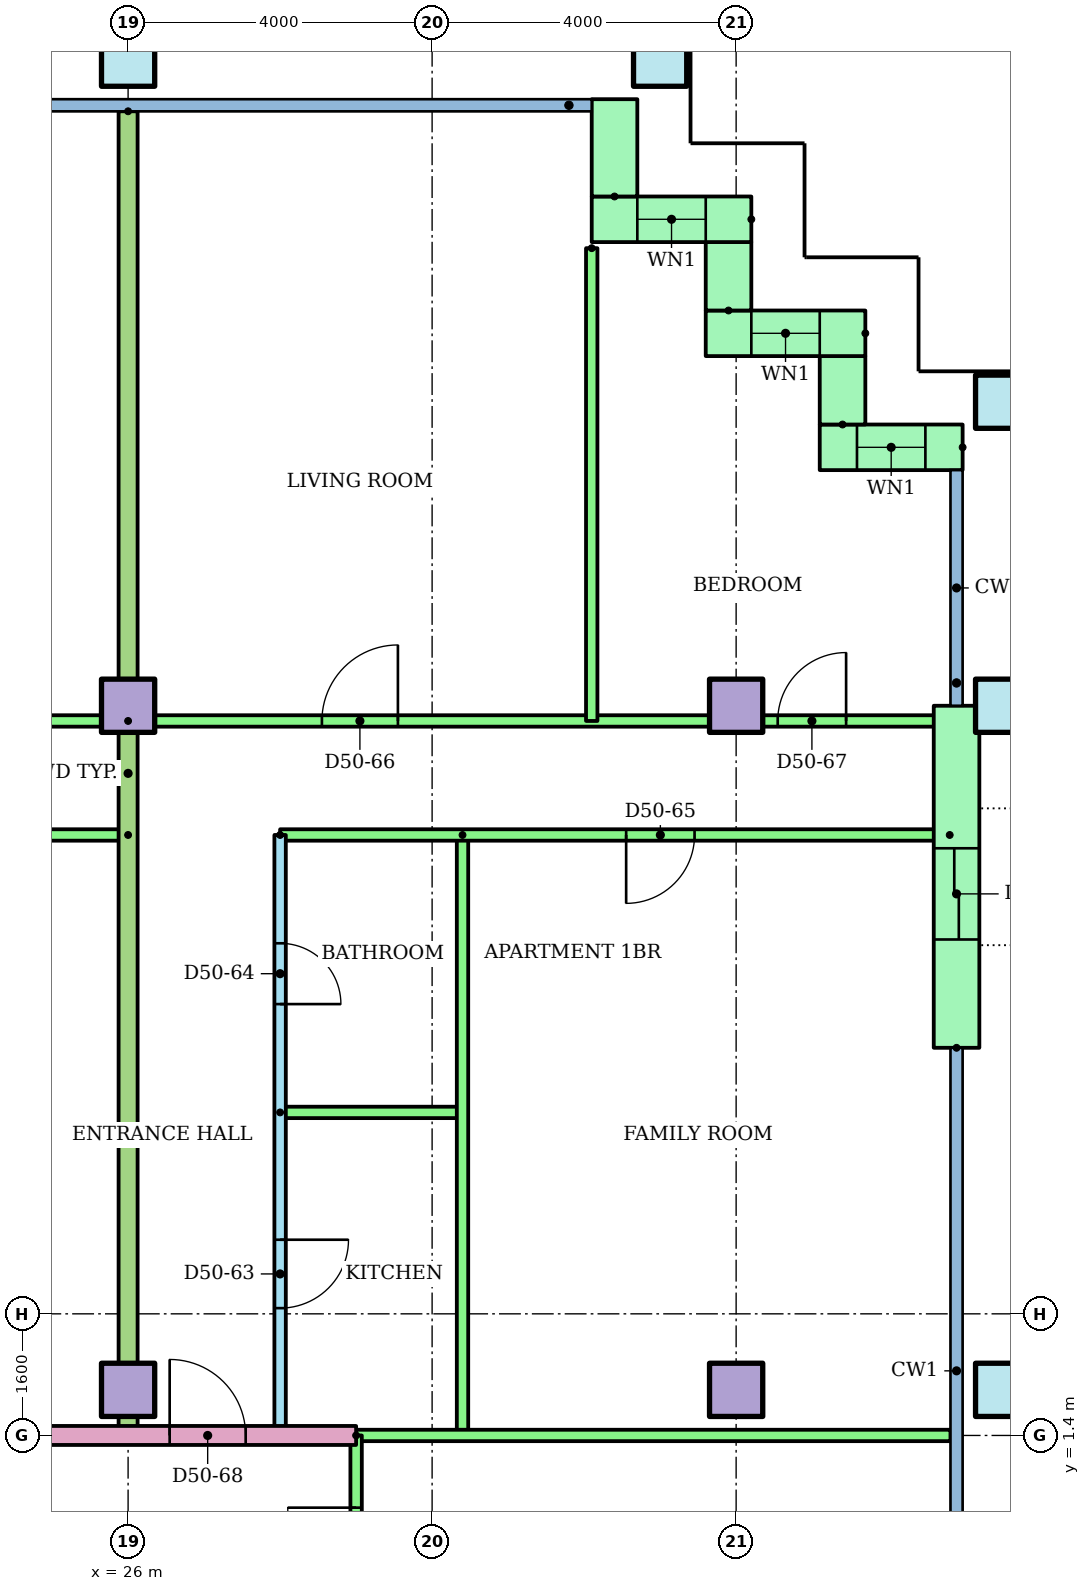
"""IFC4 building model, lengths in metres.
Left out: names, types, materials, properties, quantities, classifications, styles, units other than length and angle.
Written with IfcOpenShell. Run it as: python <this file> out.ifc"""

import sys

from ifc_helpers import new_model, si_unit, direction, frame, frame_2d, origin, origin_2d, place, context, subcontext, project, spatial, rectangle, hollow_rectangle, extrude, element, fill, save


model = new_model("IFC4")
c1 = context("Model", 3, precision=1e-05, world=origin(), true_north=direction((0.0, 1.0)))
c2 = subcontext(c1, "Body", "Model", "MODEL_VIEW")
j1 = project(units=[si_unit("LENGTHUNIT", "METRE"), si_unit("PLANEANGLEUNIT", "RADIAN")], contexts=[c1])
p1 = place(None, origin())
s1 = spatial("IfcSite", under=j1, at=p1, CompositionType="ELEMENT")
p2 = place(p1, origin())
s2 = spatial("IfcBuilding", under=s1, at=p2, CompositionType="ELEMENT")
p3 = place(p2, frame((0.0, 0.0, 190.9)))
s3 = spatial("IfcBuildingStorey", under=s2, at=p3, CompositionType="ELEMENT", Elevation=190.9)
for number, where in (
    (1, (26.0, 2.0, 0.0)),
    (2, (34.0, 2.0, 0.0)),
):
    element("IfcColumn", number, at=place(p3, frame(where)), inside=s3, PredefinedType="COLUMN", context=c2, shape_type="SweptSolid", body=[
        extrude(rectangle(XDim=0.7, YDim=0.7, at=origin_2d()), origin(), (0.0, 0.0, 1.0), 3.2),
    ])
p4 = place(p3, frame((37.5, 2.0, 0.0)))
e3 = element("IfcColumn", 3, at=p4, inside=s3, PredefinedType="COLUMN", context=c2, shape_type="SweptSolid", body=[
    extrude(hollow_rectangle(XDim=0.7, YDim=0.7, WallThickness=0.036, at=origin_2d()), origin(), (0.0, 0.0, 1.0), 3.2),
])
for number, where in (
    (4, (26.0, 11.0, 0.0)),
    (5, (34.0, 11.0, 0.0)),
):
    element("IfcColumn", number, at=place(p3, frame(where)), inside=s3, PredefinedType="COLUMN", context=c2, shape_type="SweptSolid", body=[
        extrude(rectangle(XDim=0.7, YDim=0.7, at=origin_2d()), origin(), (0.0, 0.0, 1.0), 3.2),
    ])
for number, where in (
    (6, (37.5, 11.0, 0.0)),
    (7, (37.5, 15.0, 0.0)),
    (8, (26.0, 19.5, 0.0)),
    (9, (33.0, 19.5, 0.0)),
):
    element("IfcColumn", number, at=place(p3, frame(where)), inside=s3, PredefinedType="COLUMN", context=c2, shape_type="SweptSolid", body=[
        extrude(hollow_rectangle(XDim=0.7, YDim=0.7, WallThickness=0.036, at=origin_2d()), origin(), (0.0, 0.0, 1.0), 3.2),
    ])
p5 = place(p3, frame((36.98, 14.4, 0.0), z_axis=(0.0, 0.0, 1.0), x_axis=(-1.0, 0.0, 0.0)))
e10 = element("IfcWall", 10, at=p5, inside=s3, PredefinedType="STANDARD", context=c2, shape_type="SweptSolid", body=[
    extrude(rectangle(XDim=1.88, YDim=0.6, at=frame_2d((0.94, 0.0))), origin(), (0.0, 0.0, 1.0), 2.8),
])
p6 = place(p5, frame((0.49, 0.0, 0.9)))
e11 = element("IfcOpeningElement", 11, at=p6, cuts=e10, PredefinedType="OPENING", context=c2, shape_type="SweptSolid", body=[
    extrude(rectangle(XDim=0.9, YDim=1.5, at=frame_2d((0.45, 0.75))), frame((0.0, 0.31, 0.0), z_axis=(0.0, -1.0, 0.0), x_axis=(1.0, 0.0, 0.0)), (0.0, 0.0, 1.0), 0.62),
])
p7 = place(p3, frame((35.4, 14.7, 0.0), z_axis=(0.0, 0.0, 1.0), x_axis=(0.0, 1.0, 0.0)))
e12 = element("IfcWall", 12, at=p7, inside=s3, PredefinedType="STANDARD", context=c2, shape_type="SweptSolid", body=[
    extrude(rectangle(XDim=0.9, YDim=0.6, at=frame_2d((0.45, 0.0))), origin(), (0.0, 0.0, 1.0), 2.8),
])
p8 = place(p3, frame((35.7, 15.9, 0.0), z_axis=(0.0, 0.0, 1.0), x_axis=(-1.0, 0.0, 0.0)))
e13 = element("IfcWall", 13, at=p8, inside=s3, PredefinedType="STANDARD", context=c2, shape_type="SweptSolid", body=[
    extrude(rectangle(XDim=2.1, YDim=0.6, at=frame_2d((1.05, 0.0))), origin(), (0.0, 0.0, 1.0), 2.8),
])
p9 = place(p8, frame((0.6, 0.0, 0.9)))
e14 = element("IfcOpeningElement", 14, at=p9, cuts=e13, PredefinedType="OPENING", context=c2, shape_type="SweptSolid", body=[
    extrude(rectangle(XDim=0.9, YDim=1.5, at=frame_2d((0.45, 0.75))), frame((0.0, 0.31, 0.0), z_axis=(0.0, -1.0, 0.0), x_axis=(1.0, 0.0, 0.0)), (0.0, 0.0, 1.0), 0.62),
])
p10 = place(p3, frame((33.9, 16.2, 0.0), z_axis=(0.0, 0.0, 1.0), x_axis=(0.0, 1.0, 0.0)))
e15 = element("IfcWall", 15, at=p10, inside=s3, PredefinedType="STANDARD", context=c2, shape_type="SweptSolid", body=[
    extrude(rectangle(XDim=0.9, YDim=0.6, at=frame_2d((0.45, 0.0))), origin(), (0.0, 0.0, 1.0), 2.8),
])
p11 = place(p3, frame((34.2, 17.4, 0.0), z_axis=(0.0, 0.0, 1.0), x_axis=(-1.0, 0.0, 0.0)))
e16 = element("IfcWall", 16, at=p11, inside=s3, PredefinedType="STANDARD", context=c2, shape_type="SweptSolid", body=[
    extrude(rectangle(XDim=2.1, YDim=0.6, at=frame_2d((1.05, 0.0))), origin(), (0.0, 0.0, 1.0), 2.8),
])
p12 = place(p11, frame((0.6, 0.0, 0.9)))
e17 = element("IfcOpeningElement", 17, at=p12, cuts=e16, PredefinedType="OPENING", context=c2, shape_type="SweptSolid", body=[
    extrude(rectangle(XDim=0.9, YDim=1.5, at=frame_2d((0.45, 0.75))), frame((0.0, 0.31, 0.0), z_axis=(0.0, -1.0, 0.0), x_axis=(1.0, 0.0, 0.0)), (0.0, 0.0, 1.0), 0.62),
])
p13 = place(p3, frame((32.4, 17.7, 0.0), z_axis=(0.0, 0.0, 1.0), x_axis=(0.0, 1.0, 0.0)))
e18 = element("IfcWall", 18, at=p13, inside=s3, PredefinedType="STANDARD", context=c2, shape_type="SweptSolid", body=[
    extrude(rectangle(XDim=1.28, YDim=0.6, at=frame_2d((0.64, 0.0))), origin(), (0.0, 0.0, 1.0), 2.8),
])
p14 = place(p3, frame((36.9, 6.5, 0.0), z_axis=(0.0, 0.0, 1.0), x_axis=(0.0, 1.0, 0.0)))
e19 = element("IfcWall", 19, at=p14, inside=s3, PredefinedType="STANDARD", context=c2, shape_type="SweptSolid", body=[
    extrude(rectangle(XDim=4.5, YDim=0.6, at=frame_2d((2.25, 0.0))), origin(), (0.0, 0.0, 1.0), 2.8),
])
p15 = place(p14, frame((1.425, 0.0, 0.0)))
e20 = element("IfcOpeningElement", 20, at=p15, cuts=e19, PredefinedType="OPENING", context=c2, shape_type="SweptSolid", body=[
    extrude(rectangle(XDim=1.2, YDim=2.1, at=frame_2d((0.6, 1.05))), frame((0.0, 0.31, 0.0), z_axis=(0.0, -1.0, 0.0), x_axis=(1.0, 0.0, 0.0)), (0.0, 0.0, 1.0), 0.62),
])
p16 = place(p3, frame((26.0, 9.3, 0.0), z_axis=(0.0, 0.0, 1.0), x_axis=(-1.0, 0.0, 0.0)))
e21 = element("IfcWall", 21, at=p16, inside=s3, PredefinedType="PARTITIONING", context=c2, shape_type="SweptSolid", body=[
    extrude(rectangle(XDim=10.0, YDim=0.15, at=frame_2d((5.0, 0.0))), origin(), (0.0, 0.0, 1.0), 2.4),
])
p17 = place(p16, frame((5.525, 0.0, 0.0)))
e22 = element("IfcOpeningElement", 22, at=p17, cuts=e21, PredefinedType="OPENING", context=c2, shape_type="SweptSolid", body=[
    extrude(rectangle(XDim=0.9, YDim=2.1, at=frame_2d((0.45, 1.05))), frame((0.0, 0.085, 0.0), z_axis=(0.0, -1.0, 0.0), x_axis=(1.0, 0.0, 0.0)), (0.0, 0.0, 1.0), 0.17),
])
p18 = place(p16, frame((1.725, 0.0, 0.0)))
e23 = element("IfcOpeningElement", 23, at=p18, cuts=e21, PredefinedType="OPENING", context=c2, shape_type="SweptSolid", body=[
    extrude(rectangle(XDim=0.9, YDim=2.1, at=frame_2d((0.45, 1.05))), frame((0.0, 0.085, 0.0), z_axis=(0.0, -1.0, 0.0), x_axis=(1.0, 0.0, 0.0)), (0.0, 0.0, 1.0), 0.17),
])
p19 = place(p3, frame((14.0, 10.8, 0.0)))
e24 = element("IfcWall", 24, at=p19, inside=s3, PredefinedType="PARTITIONING", context=c2, shape_type="SweptSolid", body=[
    extrude(rectangle(XDim=12.0, YDim=0.15, at=frame_2d((6.0, 0.0))), origin(), (0.0, 0.0, 1.0), 2.4),
])
p20 = place(p19, frame((1.5, 0.0, 0.0)))
e25 = element("IfcOpeningElement", 25, at=p20, cuts=e24, PredefinedType="OPENING", context=c2, shape_type="SweptSolid", body=[
    extrude(rectangle(XDim=1.0, YDim=2.1, at=frame_2d((0.5, 1.05))), frame((0.0, 0.085, 0.0), z_axis=(0.0, -1.0, 0.0), x_axis=(1.0, 0.0, 0.0)), (0.0, 0.0, 1.0), 0.17),
])
p21 = place(p19, frame((7.5, 0.0, 0.0)))
e26 = element("IfcOpeningElement", 26, at=p21, cuts=e24, PredefinedType="OPENING", context=c2, shape_type="SweptSolid", body=[
    extrude(rectangle(XDim=1.0, YDim=2.1, at=frame_2d((0.5, 1.05))), frame((0.0, 0.085, 0.0), z_axis=(0.0, -1.0, 0.0), x_axis=(1.0, 0.0, 0.0)), (0.0, 0.0, 1.0), 0.17),
])
p22 = place(p3, frame((28.0, 9.3, 0.0), z_axis=(0.0, 0.0, 1.0), x_axis=(0.0, -1.0, 0.0)))
e27 = element("IfcWall", 27, at=p22, inside=s3, PredefinedType="PARTITIONING", context=c2, shape_type="SweptSolid", body=[
    extrude(rectangle(XDim=7.9, YDim=0.15, at=frame_2d((3.95, 0.0))), origin(), (0.0, 0.0, 1.0), 2.4),
])
p23 = place(p22, frame((5.325, 0.0, 0.0)))
e28 = element("IfcOpeningElement", 28, at=p23, cuts=e27, PredefinedType="OPENING", context=c2, shape_type="SweptSolid", body=[
    extrude(rectangle(XDim=0.9, YDim=2.1, at=frame_2d((0.45, 1.05))), frame((0.0, 0.085, 0.0), z_axis=(0.0, -1.0, 0.0), x_axis=(1.0, 0.0, 0.0)), (0.0, 0.0, 1.0), 0.17),
])
p24 = place(p22, frame((1.425, 0.0, 0.0)))
e29 = element("IfcOpeningElement", 29, at=p24, cuts=e27, PredefinedType="OPENING", context=c2, shape_type="SweptSolid", body=[
    extrude(rectangle(XDim=0.8, YDim=2.1, at=frame_2d((0.4, 1.05))), frame((0.0, 0.085, 0.0), z_axis=(0.0, -1.0, 0.0), x_axis=(1.0, 0.0, 0.0)), (0.0, 0.0, 1.0), 0.17),
])
p25 = place(p3, frame((28.0, 5.65, 0.0)))
e30 = element("IfcWall", 30, at=p25, inside=s3, PredefinedType="PARTITIONING", context=c2, shape_type="SweptSolid", body=[
    extrude(rectangle(XDim=2.4, YDim=0.15, at=frame_2d((1.2, 0.0))), origin(), (0.0, 0.0, 1.0), 2.4),
])
p26 = place(p3, frame((30.4, 9.3, 0.0), z_axis=(0.0, 0.0, 1.0), x_axis=(0.0, -1.0, 0.0)))
e31 = element("IfcWall", 31, at=p26, inside=s3, PredefinedType="PARTITIONING", context=c2, shape_type="SweptSolid", body=[
    extrude(rectangle(XDim=7.9, YDim=0.15, at=frame_2d((3.95, 0.0))), origin(), (0.0, 0.0, 1.0), 2.4),
])
p27 = place(p3, frame((36.81, 9.3, 0.0), z_axis=(0.0, 0.0, 1.0), x_axis=(-1.0, 0.0, 0.0)))
e32 = element("IfcWall", 32, at=p27, inside=s3, PredefinedType="PARTITIONING", context=c2, shape_type="SweptSolid", body=[
    extrude(rectangle(XDim=8.81, YDim=0.15, at=frame_2d((4.405, 0.0))), origin(), (0.0, 0.0, 1.0), 2.4),
])
p28 = place(p27, frame((3.357, 0.0, 0.0)))
e33 = element("IfcOpeningElement", 33, at=p28, cuts=e32, PredefinedType="OPENING", context=c2, shape_type="SweptSolid", body=[
    extrude(rectangle(XDim=0.9, YDim=2.1, at=frame_2d((0.45, 1.05))), frame((0.0, 0.085, 0.0), z_axis=(0.0, -1.0, 0.0), x_axis=(1.0, 0.0, 0.0)), (0.0, 0.0, 1.0), 0.17),
])
p29 = place(p3, frame((26.0, 10.8, 0.0)))
e34 = element("IfcWall", 34, at=p29, inside=s3, PredefinedType="PARTITIONING", context=c2, shape_type="SweptSolid", body=[
    extrude(rectangle(XDim=10.81, YDim=0.15, at=frame_2d((5.405, 0.0))), origin(), (0.0, 0.0, 1.0), 2.4),
])
p30 = place(p29, frame((2.55, 0.0, 0.0)))
e35 = element("IfcOpeningElement", 35, at=p30, cuts=e34, PredefinedType="OPENING", context=c2, shape_type="SweptSolid", body=[
    extrude(rectangle(XDim=1.0, YDim=2.1, at=frame_2d((0.5, 1.05))), frame((0.0, 0.085, 0.0), z_axis=(0.0, -1.0, 0.0), x_axis=(1.0, 0.0, 0.0)), (0.0, 0.0, 1.0), 0.17),
])
p31 = place(p29, frame((8.547, 0.0, 0.0)))
e36 = element("IfcOpeningElement", 36, at=p31, cuts=e34, PredefinedType="OPENING", context=c2, shape_type="SweptSolid", body=[
    extrude(rectangle(XDim=0.9, YDim=2.1, at=frame_2d((0.45, 1.05))), frame((0.0, 0.085, 0.0), z_axis=(0.0, -1.0, 0.0), x_axis=(1.0, 0.0, 0.0)), (0.0, 0.0, 1.0), 0.17),
])
p32 = place(p3, frame((32.1, 17.02, 0.0), z_axis=(0.0, 0.0, 1.0), x_axis=(0.0, -1.0, 0.0)))
e37 = element("IfcWall", 37, at=p32, inside=s3, PredefinedType="PARTITIONING", context=c2, shape_type="SweptSolid", body=[
    extrude(rectangle(XDim=6.22, YDim=0.15, at=frame_2d((3.11, 0.0))), origin(), (0.0, 0.0, 1.0), 2.4),
])
p33 = place(p3, frame((26.0, 18.821, 0.0), z_axis=(0.0, 0.0, 1.0), x_axis=(0.0, -1.0, 0.0)))
e38 = element("IfcWall", 38, at=p33, inside=s3, PredefinedType="PARTITIONING", context=c2, shape_type="SweptSolid", body=[
    extrude(rectangle(XDim=17.421, YDim=0.25, at=frame_2d((8.71, 0.0))), origin(), (0.0, 0.0, 1.0), 2.4),
])
p34 = place(p3, frame((14.0, 1.4, 0.0)))
e39 = element("IfcWall", 39, at=p34, inside=s3, PredefinedType="PARTITIONING", context=c2, shape_type="SweptSolid", body=[
    extrude(rectangle(XDim=15.0, YDim=0.25, at=frame_2d((7.5, 0.0))), origin(), (0.0, 0.0, 1.0), 2.4),
])
p35 = place(p34, frame((0.5, 0.0, 0.0)))
e40 = element("IfcOpeningElement", 40, at=p35, cuts=e39, PredefinedType="OPENING", context=c2, shape_type="SweptSolid", body=[
    extrude(rectangle(XDim=1.0, YDim=2.1, at=frame_2d((0.5, 1.05))), frame((0.0, 0.135, 0.0), z_axis=(0.0, -1.0, 0.0), x_axis=(1.0, 0.0, 0.0)), (0.0, 0.0, 1.0), 0.27),
])
p36 = place(p34, frame((12.547, 0.0, 0.0)))
e41 = element("IfcOpeningElement", 41, at=p36, cuts=e39, PredefinedType="OPENING", context=c2, shape_type="SweptSolid", body=[
    extrude(rectangle(XDim=1.0, YDim=2.1, at=frame_2d((0.5, 1.05))), frame((0.0, 0.135, 0.0), z_axis=(0.0, -1.0, 0.0), x_axis=(1.0, 0.0, 0.0)), (0.0, 0.0, 1.0), 0.27),
])
p37 = place(p3, frame((29.0, 1.4, 0.0)))
e42 = element("IfcWall", 42, at=p37, inside=s3, PredefinedType="PARTITIONING", context=c2, shape_type="SweptSolid", body=[
    extrude(rectangle(XDim=7.82, YDim=0.15, at=frame_2d((3.91, 0.0))), origin(), (0.0, 0.0, 1.0), 2.4),
])
p38 = place(p3, frame((29.0, -1.4, 0.0), z_axis=(0.0, 0.0, 1.0), x_axis=(0.0, 1.0, 0.0)))
e43 = element("IfcWall", 43, at=p38, inside=s3, PredefinedType="PARTITIONING", context=c2, shape_type="SweptSolid", body=[
    extrude(rectangle(XDim=2.8, YDim=0.15, at=frame_2d((1.4, 0.0))), origin(), (0.0, 0.0, 1.0), 2.4),
])
p39 = place(p38, frame((0.95, 0.0, 0.0)))
e44 = element("IfcOpeningElement", 44, at=p39, cuts=e43, PredefinedType="OPENING", context=c2, shape_type="SweptSolid", body=[
    extrude(rectangle(XDim=0.9, YDim=2.1, at=frame_2d((0.45, 1.05))), frame((0.0, 0.085, 0.0), z_axis=(0.0, -1.0, 0.0), x_axis=(1.0, 0.0, 0.0)), (0.0, 0.0, 1.0), 0.17),
])
p40 = place(p6, origin())
e45 = element("IfcWindow", 45, at=p40, inside=s3, PartitioningType="SINGLE_PANEL", PredefinedType="WINDOW", context=c2, shape_type="SweptSolid", body=[
    extrude(rectangle(XDim=0.9, YDim=1.5, at=frame_2d((0.45, 0.75))), frame((0.0, 0.03, 0.0), z_axis=(0.0, -1.0, 0.0), x_axis=(1.0, 0.0, 0.0)), (0.0, 0.0, 1.0), 0.06),
])
fill(e11, e45)
p41 = place(p9, origin())
e46 = element("IfcWindow", 46, at=p41, inside=s3, PartitioningType="SINGLE_PANEL", PredefinedType="WINDOW", context=c2, shape_type="SweptSolid", body=[
    extrude(rectangle(XDim=0.9, YDim=1.5, at=frame_2d((0.45, 0.75))), frame((0.0, 0.03, 0.0), z_axis=(0.0, -1.0, 0.0), x_axis=(1.0, 0.0, 0.0)), (0.0, 0.0, 1.0), 0.06),
])
fill(e14, e46)
p42 = place(p12, origin())
e47 = element("IfcWindow", 47, at=p42, inside=s3, PartitioningType="SINGLE_PANEL", PredefinedType="WINDOW", context=c2, shape_type="SweptSolid", body=[
    extrude(rectangle(XDim=0.9, YDim=1.5, at=frame_2d((0.45, 0.75))), frame((0.0, 0.03, 0.0), z_axis=(0.0, -1.0, 0.0), x_axis=(1.0, 0.0, 0.0)), (0.0, 0.0, 1.0), 0.06),
])
fill(e17, e47)
p43 = place(p23, origin())
e48 = element("IfcDoor", 48, at=p43, inside=s3, OperationType="SINGLE_SWING_LEFT", PredefinedType="DOOR", context=c2, shape_type="SweptSolid", body=[
    extrude(rectangle(XDim=0.9, YDim=2.1, at=frame_2d((0.45, 1.05))), frame((0.0, 0.025, 0.0), z_axis=(0.0, -1.0, 0.0), x_axis=(1.0, 0.0, 0.0)), (0.0, 0.0, 1.0), 0.05),
])
fill(e28, e48)
p44 = place(p24, origin())
e49 = element("IfcDoor", 49, at=p44, inside=s3, OperationType="SINGLE_SWING_RIGHT", PredefinedType="DOOR", context=c2, shape_type="SweptSolid", body=[
    extrude(rectangle(XDim=0.8, YDim=2.1, at=frame_2d((0.4, 1.05))), frame((0.0, 0.025, 0.0), z_axis=(0.0, -1.0, 0.0), x_axis=(1.0, 0.0, 0.0)), (0.0, 0.0, 1.0), 0.05),
])
fill(e29, e49)
p45 = place(p28, origin())
e50 = element("IfcDoor", 50, at=p45, inside=s3, OperationType="SINGLE_SWING_RIGHT", PredefinedType="DOOR", context=c2, shape_type="SweptSolid", body=[
    extrude(rectangle(XDim=0.9, YDim=2.1, at=frame_2d((0.45, 1.05))), frame((0.0, 0.025, 0.0), z_axis=(0.0, -1.0, 0.0), x_axis=(1.0, 0.0, 0.0)), (0.0, 0.0, 1.0), 0.05),
])
fill(e33, e50)
p46 = place(p30, origin())
e51 = element("IfcDoor", 51, at=p46, inside=s3, OperationType="SINGLE_SWING_RIGHT", PredefinedType="DOOR", context=c2, shape_type="SweptSolid", body=[
    extrude(rectangle(XDim=1.0, YDim=2.1, at=frame_2d((0.5, 1.05))), frame((0.0, 0.025, 0.0), z_axis=(0.0, -1.0, 0.0), x_axis=(1.0, 0.0, 0.0)), (0.0, 0.0, 1.0), 0.05),
])
fill(e35, e51)
p47 = place(p31, origin())
e52 = element("IfcDoor", 52, at=p47, inside=s3, OperationType="SINGLE_SWING_RIGHT", PredefinedType="DOOR", context=c2, shape_type="SweptSolid", body=[
    extrude(rectangle(XDim=0.9, YDim=2.1, at=frame_2d((0.45, 1.05))), frame((0.0, 0.025, 0.0), z_axis=(0.0, -1.0, 0.0), x_axis=(1.0, 0.0, 0.0)), (0.0, 0.0, 1.0), 0.05),
])
fill(e36, e52)
p48 = place(p36, origin())
e53 = element("IfcDoor", 53, at=p48, inside=s3, OperationType="SINGLE_SWING_LEFT", PredefinedType="DOOR", context=c2, shape_type="SweptSolid", body=[
    extrude(rectangle(XDim=1.0, YDim=2.1, at=frame_2d((0.5, 1.05))), frame((0.0, 0.025, 0.0), z_axis=(0.0, -1.0, 0.0), x_axis=(1.0, 0.0, 0.0)), (0.0, 0.0, 1.0), 0.05),
])
fill(e41, e53)
p49 = place(p39, origin())
e54 = element("IfcDoor", 54, at=p49, inside=s3, OperationType="SINGLE_SWING_RIGHT", PredefinedType="DOOR", context=c2, shape_type="SweptSolid", body=[
    extrude(rectangle(XDim=0.9, YDim=2.1, at=frame_2d((0.45, 1.05))), frame((0.0, 0.025, 0.0), z_axis=(0.0, -1.0, 0.0), x_axis=(1.0, 0.0, 0.0)), (0.0, 0.0, 1.0), 0.05),
])
fill(e44, e54)
p50 = place(p15, origin())
e55 = element("IfcDoor", 55, at=p50, inside=s3, OperationType="SLIDING_TO_LEFT", PredefinedType="DOOR", context=c2, shape_type="SweptSolid", body=[
    extrude(rectangle(XDim=1.2, YDim=2.1, at=frame_2d((0.6, 1.05))), frame((0.0, 0.025, 0.0), z_axis=(0.0, -1.0, 0.0), x_axis=(1.0, 0.0, 0.0)), (0.0, 0.0, 1.0), 0.05),
])
fill(e20, e55)
save(model, sys.argv[1])
